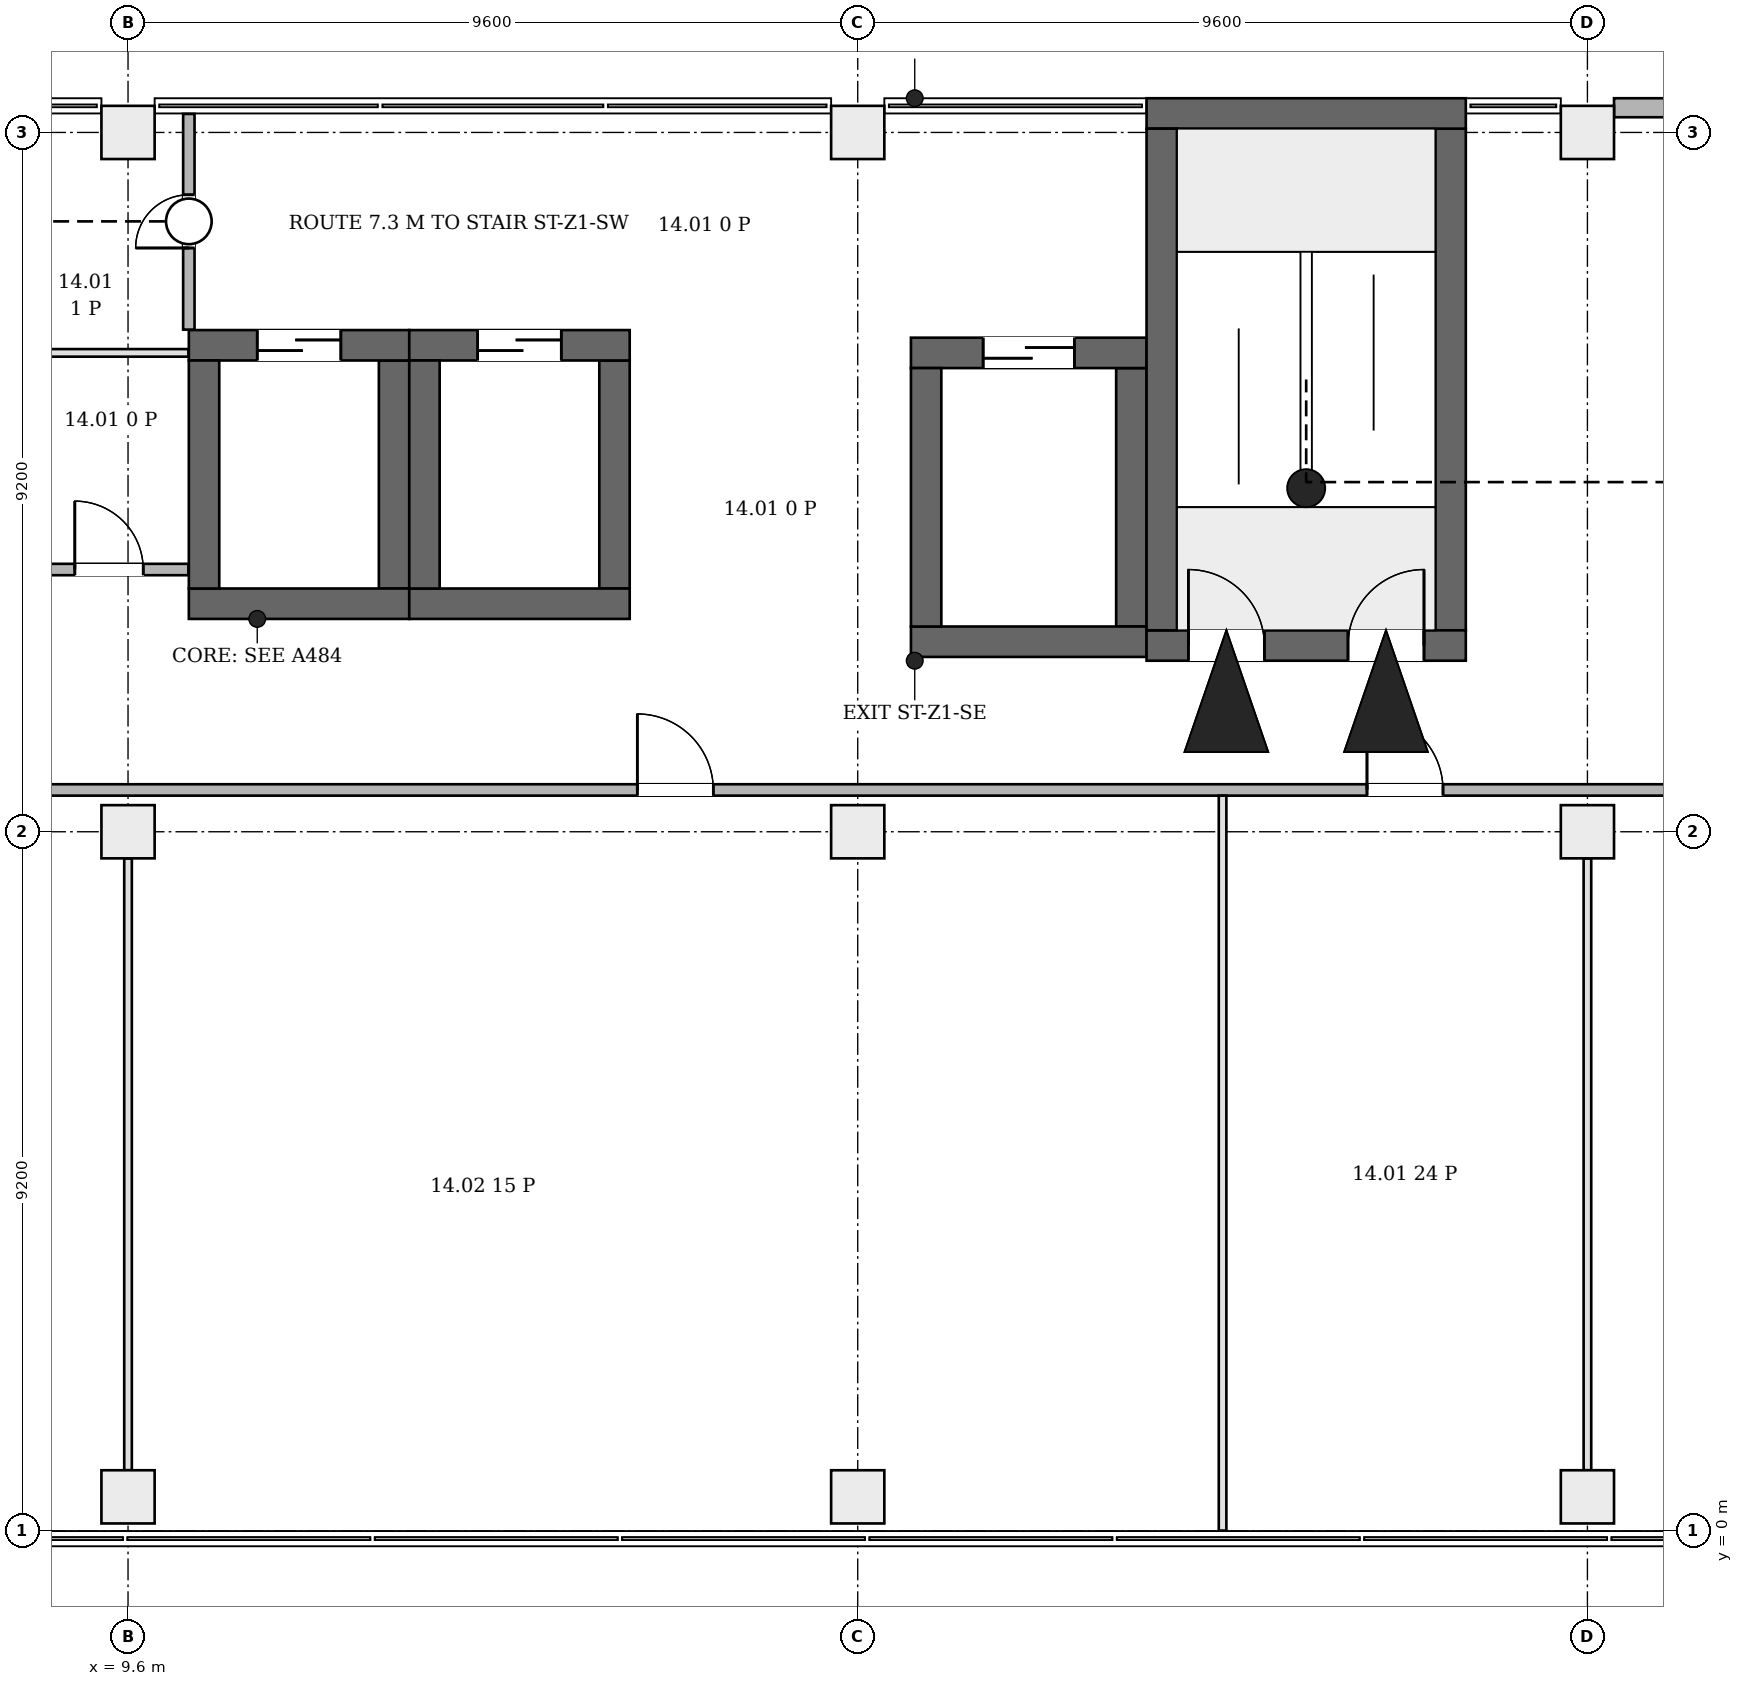
"""IFC4 building model, lengths in metres.
Left out: names, types, materials, properties, quantities, classifications, styles, units other than length and angle.
Written with IfcOpenShell. Run it as: python <this file> out.ifc"""

import sys

from ifc_helpers import new_model, si_unit, direction, frame, frame_2d, origin, origin_2d, place, context, subcontext, project, spatial, rectangle, extrude, element, fill, save


model = new_model("IFC4")
c1 = context("Model", 3, precision=1e-05, world=origin(), true_north=direction((0.0, 1.0)))
c2 = subcontext(c1, "Body", "Model", "MODEL_VIEW")
j1 = project(units=[si_unit("LENGTHUNIT", "METRE"), si_unit("PLANEANGLEUNIT", "RADIAN")], contexts=[c1])
p1 = place(None, origin())
s1 = spatial("IfcSite", under=j1, at=p1, CompositionType="ELEMENT")
p2 = place(p1, origin())
s2 = spatial("IfcBuilding", under=s1, at=p2, CompositionType="ELEMENT")
p3 = place(p2, frame((0.0, 0.0, 69.7)))
s3 = spatial("IfcBuildingStorey", under=s2, at=p3, CompositionType="ELEMENT", Elevation=69.7)
p4 = place(p3, frame((23.0, 11.65, 0.0), z_axis=(0.0, 0.0, 1.0), x_axis=(1.0, 0.0, 0.0)))
e1 = element("IfcWall", 1, at=p4, inside=s3, PredefinedType="SHEAR", context=c2, shape_type="SweptSolid", body=[
    extrude(rectangle(XDim=4.2, YDim=0.4, at=frame_2d((2.1, 0.0))), origin(), (0.0, 0.0, 1.0), 4.2),
])
p5 = place(p4, frame((0.55, 0.0, 0.0)))
e2 = element("IfcOpeningElement", 2, at=p5, cuts=e1, PredefinedType="OPENING", context=c2, shape_type="SweptSolid", body=[
    extrude(rectangle(XDim=1.0, YDim=2.1, at=frame_2d((0.5, 1.05))), frame((0.0, 0.21, 0.0), z_axis=(0.0, -1.0, 0.0), x_axis=(1.0, 0.0, 0.0)), (0.0, 0.0, 1.0), 0.42),
])
p6 = place(p4, frame((2.65, 0.0, 0.0)))
e3 = element("IfcOpeningElement", 3, at=p6, cuts=e1, PredefinedType="OPENING", context=c2, shape_type="SweptSolid", body=[
    extrude(rectangle(XDim=1.0, YDim=2.1, at=frame_2d((0.5, 1.05))), frame((0.0, 0.21, 0.0), z_axis=(0.0, -1.0, 0.0), x_axis=(1.0, 0.0, 0.0)), (0.0, 0.0, 1.0), 0.42),
])
p7 = place(p3, frame((23.0, 18.65, 0.0), z_axis=(0.0, 0.0, 1.0), x_axis=(1.0, 0.0, 0.0)))
e4 = element("IfcWall", 4, at=p7, inside=s3, PredefinedType="SHEAR", context=c2, shape_type="SweptSolid", body=[
    extrude(rectangle(XDim=4.2, YDim=0.4, at=frame_2d((2.1, 0.0))), origin(), (0.0, 0.0, 1.0), 4.2),
])
for number, where, z_axis, x_axis in (
    (5, (23.2, 11.85, 0.0), (0.0, 0.0, 1.0), (0.0, 1.0, 0.0)),
    (6, (27.0, 11.85, 0.0), (0.0, 0.0, 1.0), (0.0, 1.0, 0.0)),
):
    element("IfcWall", number, at=place(p3, frame(where, z_axis=z_axis, x_axis=x_axis)), inside=s3, PredefinedType="SHEAR", context=c2, shape_type="SweptSolid", body=[
        extrude(rectangle(XDim=6.6, YDim=0.4, at=frame_2d((3.3, 0.0))), origin(), (0.0, 0.0, 1.0), 4.2),
    ])
p8 = place(p3, frame((10.4, 12.2, 0.0), z_axis=(0.0, 0.0, 1.0), x_axis=(1.0, 0.0, 0.0)))
e7 = element("IfcWall", 7, at=p8, inside=s3, PredefinedType="SHEAR", context=c2, shape_type="SweptSolid", body=[
    extrude(rectangle(XDim=2.9, YDim=0.4, at=frame_2d((1.45, 0.0))), origin(), (0.0, 0.0, 1.0), 4.2),
])
p9 = place(p3, frame((10.4, 15.6, 0.0), z_axis=(0.0, 0.0, 1.0), x_axis=(1.0, 0.0, 0.0)))
e8 = element("IfcWall", 8, at=p9, inside=s3, PredefinedType="SHEAR", context=c2, shape_type="SweptSolid", body=[
    extrude(rectangle(XDim=2.9, YDim=0.4, at=frame_2d((1.45, 0.0))), origin(), (0.0, 0.0, 1.0), 4.2),
])
p10 = place(p9, frame((0.9, 0.0, 0.0)))
e9 = element("IfcOpeningElement", 9, at=p10, cuts=e8, PredefinedType="OPENING", context=c2, shape_type="SweptSolid", body=[
    extrude(rectangle(XDim=1.1, YDim=2.1, at=frame_2d((0.55, 1.05))), frame((0.0, 0.21, 0.0), z_axis=(0.0, -1.0, 0.0), x_axis=(1.0, 0.0, 0.0)), (0.0, 0.0, 1.0), 0.42),
])
for number, where, z_axis, x_axis in (
    (10, (10.6, 12.4, 0.0), (0.0, 0.0, 1.0), (0.0, 1.0, 0.0)),
    (11, (13.1, 12.4, 0.0), (0.0, 0.0, 1.0), (0.0, 1.0, 0.0)),
):
    element("IfcWall", number, at=place(p3, frame(where, z_axis=z_axis, x_axis=x_axis)), inside=s3, PredefinedType="SHEAR", context=c2, shape_type="SweptSolid", body=[
        extrude(rectangle(XDim=3.0, YDim=0.4, at=frame_2d((1.5, 0.0))), origin(), (0.0, 0.0, 1.0), 4.2),
    ])
p11 = place(p3, frame((13.3, 12.2, 0.0), z_axis=(0.0, 0.0, 1.0), x_axis=(1.0, 0.0, 0.0)))
e12 = element("IfcWall", 12, at=p11, inside=s3, PredefinedType="SHEAR", context=c2, shape_type="SweptSolid", body=[
    extrude(rectangle(XDim=2.9, YDim=0.4, at=frame_2d((1.45, 0.0))), origin(), (0.0, 0.0, 1.0), 4.2),
])
p12 = place(p3, frame((13.3, 15.6, 0.0), z_axis=(0.0, 0.0, 1.0), x_axis=(1.0, 0.0, 0.0)))
e13 = element("IfcWall", 13, at=p12, inside=s3, PredefinedType="SHEAR", context=c2, shape_type="SweptSolid", body=[
    extrude(rectangle(XDim=2.9, YDim=0.4, at=frame_2d((1.45, 0.0))), origin(), (0.0, 0.0, 1.0), 4.2),
])
p13 = place(p12, frame((0.9, 0.0, 0.0)))
e14 = element("IfcOpeningElement", 14, at=p13, cuts=e13, PredefinedType="OPENING", context=c2, shape_type="SweptSolid", body=[
    extrude(rectangle(XDim=1.1, YDim=2.1, at=frame_2d((0.55, 1.05))), frame((0.0, 0.21, 0.0), z_axis=(0.0, -1.0, 0.0), x_axis=(1.0, 0.0, 0.0)), (0.0, 0.0, 1.0), 0.42),
])
for number, where, z_axis, x_axis in (
    (15, (13.5, 12.4, 0.0), (0.0, 0.0, 1.0), (0.0, 1.0, 0.0)),
    (16, (16.0, 12.4, 0.0), (0.0, 0.0, 1.0), (0.0, 1.0, 0.0)),
):
    element("IfcWall", number, at=place(p3, frame(where, z_axis=z_axis, x_axis=x_axis)), inside=s3, PredefinedType="SHEAR", context=c2, shape_type="SweptSolid", body=[
        extrude(rectangle(XDim=3.0, YDim=0.4, at=frame_2d((1.5, 0.0))), origin(), (0.0, 0.0, 1.0), 4.2),
    ])
p14 = place(p3, frame((19.9, 11.7, 0.0), z_axis=(0.0, 0.0, 1.0), x_axis=(1.0, 0.0, 0.0)))
e17 = element("IfcWall", 17, at=p14, inside=s3, PredefinedType="SHEAR", context=c2, shape_type="SweptSolid", body=[
    extrude(rectangle(XDim=3.1, YDim=0.4, at=frame_2d((1.55, 0.0))), origin(), (0.0, 0.0, 1.0), 4.2),
])
p15 = place(p3, frame((19.9, 15.5, 0.0), z_axis=(0.0, 0.0, 1.0), x_axis=(1.0, 0.0, 0.0)))
e18 = element("IfcWall", 18, at=p15, inside=s3, PredefinedType="SHEAR", context=c2, shape_type="SweptSolid", body=[
    extrude(rectangle(XDim=3.1, YDim=0.4, at=frame_2d((1.55, 0.0))), origin(), (0.0, 0.0, 1.0), 4.2),
])
p16 = place(p15, frame((0.95, 0.0, 0.0)))
e19 = element("IfcOpeningElement", 19, at=p16, cuts=e18, PredefinedType="OPENING", context=c2, shape_type="SweptSolid", body=[
    extrude(rectangle(XDim=1.2, YDim=2.1, at=frame_2d((0.6, 1.05))), frame((0.0, 0.21, 0.0), z_axis=(0.0, -1.0, 0.0), x_axis=(1.0, 0.0, 0.0)), (0.0, 0.0, 1.0), 0.42),
])
for number, where, z_axis, x_axis in (
    (20, (20.1, 11.9, 0.0), (0.0, 0.0, 1.0), (0.0, 1.0, 0.0)),
    (21, (22.8, 11.9, 0.0), (0.0, 0.0, 1.0), (0.0, 1.0, 0.0)),
):
    element("IfcWall", number, at=place(p3, frame(where, z_axis=z_axis, x_axis=x_axis)), inside=s3, PredefinedType="SHEAR", context=c2, shape_type="SweptSolid", body=[
        extrude(rectangle(XDim=3.4, YDim=0.4, at=frame_2d((1.7, 0.0))), origin(), (0.0, 0.0, 1.0), 4.2),
    ])
for number, where, z_axis, x_axis in (
    (22, (9.6, 0.45, 0.0), (0.0, 0.0, 1.0), (1.0, 0.0, 0.0)),
    (23, (19.2, 0.45, 0.0), (0.0, 0.0, 1.0), (1.0, 0.0, 0.0)),
    (24, (28.8, 0.45, 0.0), (0.0, 0.0, 1.0), (1.0, 0.0, 0.0)),
    (25, (9.6, 9.2, 0.0), (0.0, 0.0, 1.0), (1.0, 0.0, 0.0)),
    (26, (19.2, 9.2, 0.0), (0.0, 0.0, 1.0), (1.0, 0.0, 0.0)),
    (27, (28.8, 9.2, 0.0), (0.0, 0.0, 1.0), (1.0, 0.0, 0.0)),
    (28, (9.6, 18.4, 0.0), (0.0, 0.0, 1.0), (1.0, 0.0, 0.0)),
    (29, (19.2, 18.4, 0.0), (0.0, 0.0, 1.0), (1.0, 0.0, 0.0)),
    (30, (28.8, 18.4, 0.0), (0.0, 0.0, 1.0), (1.0, 0.0, 0.0)),
):
    element("IfcColumn", number, at=place(p3, frame(where, z_axis=z_axis, x_axis=x_axis)), inside=s3, PredefinedType="COLUMN", context=c2, shape_type="SweptSolid", body=[
        extrude(rectangle(XDim=0.7, YDim=0.7, at=origin_2d()), origin(), (0.0, 0.0, 1.0), 4.2),
    ])
p17 = place(p3, frame((38.05, 18.725, 0.0), z_axis=(0.0, 0.0, 1.0), x_axis=(-1.0, 0.0, 0.0)))
e31 = element("IfcWall", 31, at=p17, inside=s3, PredefinedType="ELEMENTEDWALL", context=c2, shape_type="SweptSolid", body=[
    extrude(rectangle(XDim=8.9, YDim=0.25, at=frame_2d((4.45, 0.0))), origin(), (0.0, 0.0, 1.0), 3.9),
])
p18 = place(p17, frame((3.55, 0.0, 0.0)))
e32 = element("IfcOpeningElement", 32, at=p18, cuts=e31, PredefinedType="OPENING", context=c2, shape_type="SweptSolid", body=[
    extrude(rectangle(XDim=1.8, YDim=2.4, at=frame_2d((0.9, 1.2))), frame((0.0, 0.135, 0.0), z_axis=(0.0, -1.0, 0.0), x_axis=(1.0, 0.0, 0.0)), (0.0, 0.0, 1.0), 0.27),
])
p19 = place(p3, frame((4.325, 9.75, 0.0), z_axis=(0.0, 0.0, 1.0), x_axis=(1.0, 0.0, 0.0)))
e33 = element("IfcWall", 33, at=p19, inside=s3, PredefinedType="PARTITIONING", context=c2, shape_type="SweptSolid", body=[
    extrude(rectangle(XDim=34.369, YDim=0.15, at=frame_2d((17.185, 0.0))), origin(), (0.0, 0.0, 1.0), 3.9),
])
p20 = place(p19, frame((2.175, 0.0, 0.0)))
e34 = element("IfcOpeningElement", 34, at=p20, cuts=e33, PredefinedType="OPENING", context=c2, shape_type="SweptSolid", body=[
    extrude(rectangle(XDim=1.0, YDim=2.1, at=frame_2d((0.5, 1.05))), frame((0.0, 0.085, 0.0), z_axis=(0.0, -1.0, 0.0), x_axis=(1.0, 0.0, 0.0)), (0.0, 0.0, 1.0), 0.17),
])
p21 = place(p19, frame((11.975, 0.0, 0.0)))
e35 = element("IfcOpeningElement", 35, at=p21, cuts=e33, PredefinedType="OPENING", context=c2, shape_type="SweptSolid", body=[
    extrude(rectangle(XDim=1.0, YDim=2.1, at=frame_2d((0.5, 1.05))), frame((0.0, 0.085, 0.0), z_axis=(0.0, -1.0, 0.0), x_axis=(1.0, 0.0, 0.0)), (0.0, 0.0, 1.0), 0.17),
])
p22 = place(p19, frame((21.575, 0.0, 0.0)))
e36 = element("IfcOpeningElement", 36, at=p22, cuts=e33, PredefinedType="OPENING", context=c2, shape_type="SweptSolid", body=[
    extrude(rectangle(XDim=1.0, YDim=2.1, at=frame_2d((0.5, 1.05))), frame((0.0, 0.085, 0.0), z_axis=(0.0, -1.0, 0.0), x_axis=(1.0, 0.0, 0.0)), (0.0, 0.0, 1.0), 0.17),
])
p23 = place(p19, frame((28.925, 0.0, 0.0)))
e37 = element("IfcOpeningElement", 37, at=p23, cuts=e33, PredefinedType="OPENING", context=c2, shape_type="SweptSolid", body=[
    extrude(rectangle(XDim=1.0, YDim=2.1, at=frame_2d((0.5, 1.05))), frame((0.0, 0.085, 0.0), z_axis=(0.0, -1.0, 0.0), x_axis=(1.0, 0.0, 0.0)), (0.0, 0.0, 1.0), 0.17),
])
p24 = place(p3, frame((6.125, 12.65, 0.0), z_axis=(0.0, 0.0, 1.0), x_axis=(1.0, 0.0, 0.0)))
e38 = element("IfcWall", 38, at=p24, inside=s3, PredefinedType="PARTITIONING", context=c2, shape_type="SweptSolid", body=[
    extrude(rectangle(XDim=4.269, YDim=0.15, at=frame_2d((2.135, 0.0))), origin(), (0.0, 0.0, 1.0), 3.9),
])
p25 = place(p24, frame((2.775, 0.0, 0.0)))
e39 = element("IfcOpeningElement", 39, at=p25, cuts=e38, PredefinedType="OPENING", context=c2, shape_type="SweptSolid", body=[
    extrude(rectangle(XDim=0.9, YDim=2.1, at=frame_2d((0.45, 1.05))), frame((0.0, 0.085, 0.0), z_axis=(0.0, -1.0, 0.0), x_axis=(1.0, 0.0, 0.0)), (0.0, 0.0, 1.0), 0.17),
])
p26 = place(p3, frame((6.275, 15.5, 0.0), z_axis=(0.0, 0.0, 1.0), x_axis=(1.0, 0.0, 0.0)))
e40 = element("IfcWall", 40, at=p26, inside=s3, PredefinedType="PARTITIONING", context=c2, shape_type="SweptSolid", body=[
    extrude(rectangle(XDim=4.119, YDim=0.1, at=frame_2d((2.06, 0.0))), origin(), (0.0, 0.0, 1.0), 3.9),
])
p27 = place(p3, frame((9.6, 0.8, 0.0), z_axis=(0.0, 0.0, 1.0), x_axis=(0.0, 1.0, 0.0)))
e41 = element("IfcWall", 41, at=p27, inside=s3, PredefinedType="PARTITIONING", context=c2, shape_type="SweptSolid", body=[
    extrude(rectangle(XDim=8.05, YDim=0.1, at=frame_2d((4.025, 0.0))), origin(), (0.0, 0.0, 1.0), 3.9),
])
p28 = place(p3, frame((10.4, 15.806, 0.0), z_axis=(0.0, 0.0, 1.0), x_axis=(0.0, 1.0, 0.0)))
e42 = element("IfcWall", 42, at=p28, inside=s3, PredefinedType="PARTITIONING", context=c2, shape_type="SweptSolid", body=[
    extrude(rectangle(XDim=2.838, YDim=0.15, at=frame_2d((1.419, 0.0))), origin(), (0.0, 0.0, 1.0), 3.9),
])
p29 = place(p28, frame((1.074, 0.0, 0.0)))
e43 = element("IfcOpeningElement", 43, at=p29, cuts=e42, PredefinedType="OPENING", context=c2, shape_type="SweptSolid", body=[
    extrude(rectangle(XDim=0.7, YDim=2.1, at=frame_2d((0.35, 1.05))), frame((0.0, 0.085, 0.0), z_axis=(0.0, -1.0, 0.0), x_axis=(1.0, 0.0, 0.0)), (0.0, 0.0, 1.0), 0.17),
])
p30 = place(p3, frame((24.0, 0.006, 0.0), z_axis=(0.0, 0.0, 1.0), x_axis=(0.0, 1.0, 0.0)))
e44 = element("IfcWall", 44, at=p30, inside=s3, PredefinedType="PARTITIONING", context=c2, shape_type="SweptSolid", body=[
    extrude(rectangle(XDim=9.669, YDim=0.1, at=frame_2d((4.834, 0.0))), origin(), (0.0, 0.0, 1.0), 3.9),
])
p31 = place(p3, frame((28.8, 0.8, 0.0), z_axis=(0.0, 0.0, 1.0), x_axis=(0.0, 1.0, 0.0)))
e45 = element("IfcWall", 45, at=p31, inside=s3, PredefinedType="PARTITIONING", context=c2, shape_type="SweptSolid", body=[
    extrude(rectangle(XDim=8.05, YDim=0.1, at=frame_2d((4.025, 0.0))), origin(), (0.0, 0.0, 1.0), 3.9),
])
p32 = place(p5, origin())
e46 = element("IfcDoor", 46, at=p32, inside=s3, OperationType="SINGLE_SWING_RIGHT", PredefinedType="DOOR", context=c2, shape_type="SweptSolid", body=[
    extrude(rectangle(XDim=1.0, YDim=2.1, at=frame_2d((0.5, 1.05))), frame((0.0, 0.025, 0.0), z_axis=(0.0, -1.0, 0.0), x_axis=(1.0, 0.0, 0.0)), (0.0, 0.0, 1.0), 0.05),
])
fill(e2, e46)
p33 = place(p6, origin())
e47 = element("IfcDoor", 47, at=p33, inside=s3, OperationType="SINGLE_SWING_LEFT", PredefinedType="DOOR", context=c2, shape_type="SweptSolid", body=[
    extrude(rectangle(XDim=1.0, YDim=2.1, at=frame_2d((0.5, 1.05))), frame((0.0, 0.025, 0.0), z_axis=(0.0, -1.0, 0.0), x_axis=(1.0, 0.0, 0.0)), (0.0, 0.0, 1.0), 0.05),
])
fill(e3, e47)
p34 = place(p10, origin())
e48 = element("IfcDoor", 48, at=p34, inside=s3, OperationType="DOUBLE_DOOR_SLIDING", PredefinedType="DOOR", context=c2, shape_type="SweptSolid", body=[
    extrude(rectangle(XDim=1.1, YDim=2.1, at=frame_2d((0.55, 1.05))), frame((0.0, 0.025, 0.0), z_axis=(0.0, -1.0, 0.0), x_axis=(1.0, 0.0, 0.0)), (0.0, 0.0, 1.0), 0.05),
])
fill(e9, e48)
p35 = place(p13, origin())
e49 = element("IfcDoor", 49, at=p35, inside=s3, OperationType="DOUBLE_DOOR_SLIDING", PredefinedType="DOOR", context=c2, shape_type="SweptSolid", body=[
    extrude(rectangle(XDim=1.1, YDim=2.1, at=frame_2d((0.55, 1.05))), frame((0.0, 0.025, 0.0), z_axis=(0.0, -1.0, 0.0), x_axis=(1.0, 0.0, 0.0)), (0.0, 0.0, 1.0), 0.05),
])
fill(e14, e49)
p36 = place(p16, origin())
e50 = element("IfcDoor", 50, at=p36, inside=s3, OperationType="DOUBLE_DOOR_SLIDING", PredefinedType="DOOR", context=c2, shape_type="SweptSolid", body=[
    extrude(rectangle(XDim=1.2, YDim=2.1, at=frame_2d((0.6, 1.05))), frame((0.0, 0.025, 0.0), z_axis=(0.0, -1.0, 0.0), x_axis=(1.0, 0.0, 0.0)), (0.0, 0.0, 1.0), 0.05),
])
fill(e19, e50)
p37 = place(p25, origin())
e51 = element("IfcDoor", 51, at=p37, inside=s3, OperationType="SINGLE_SWING_RIGHT", PredefinedType="DOOR", context=c2, shape_type="SweptSolid", body=[
    extrude(rectangle(XDim=0.9, YDim=2.1, at=frame_2d((0.45, 1.05))), frame((0.0, 0.025, 0.0), z_axis=(0.0, -1.0, 0.0), x_axis=(1.0, 0.0, 0.0)), (0.0, 0.0, 1.0), 0.05),
])
fill(e39, e51)
p38 = place(p29, origin())
e52 = element("IfcDoor", 52, at=p38, inside=s3, OperationType="SINGLE_SWING_LEFT", PredefinedType="DOOR", context=c2, shape_type="SweptSolid", body=[
    extrude(rectangle(XDim=0.7, YDim=2.1, at=frame_2d((0.35, 1.05))), frame((0.0, 0.025, 0.0), z_axis=(0.0, -1.0, 0.0), x_axis=(1.0, 0.0, 0.0)), (0.0, 0.0, 1.0), 0.05),
])
fill(e43, e52)
p39 = place(p21, origin())
e53 = element("IfcDoor", 53, at=p39, inside=s3, OperationType="SINGLE_SWING_RIGHT", PredefinedType="DOOR", context=c2, shape_type="SweptSolid", body=[
    extrude(rectangle(XDim=1.0, YDim=2.1, at=frame_2d((0.5, 1.05))), frame((0.0, 0.025, 0.0), z_axis=(0.0, -1.0, 0.0), x_axis=(1.0, 0.0, 0.0)), (0.0, 0.0, 1.0), 0.05),
])
fill(e35, e53)
p40 = place(p22, origin())
e54 = element("IfcDoor", 54, at=p40, inside=s3, OperationType="SINGLE_SWING_LEFT", PredefinedType="DOOR", context=c2, shape_type="SweptSolid", body=[
    extrude(rectangle(XDim=1.0, YDim=2.1, at=frame_2d((0.5, 1.05))), frame((0.0, 0.025, 0.0), z_axis=(0.0, -1.0, 0.0), x_axis=(1.0, 0.0, 0.0)), (0.0, 0.0, 1.0), 0.05),
])
fill(e36, e54)
save(model, sys.argv[1])
